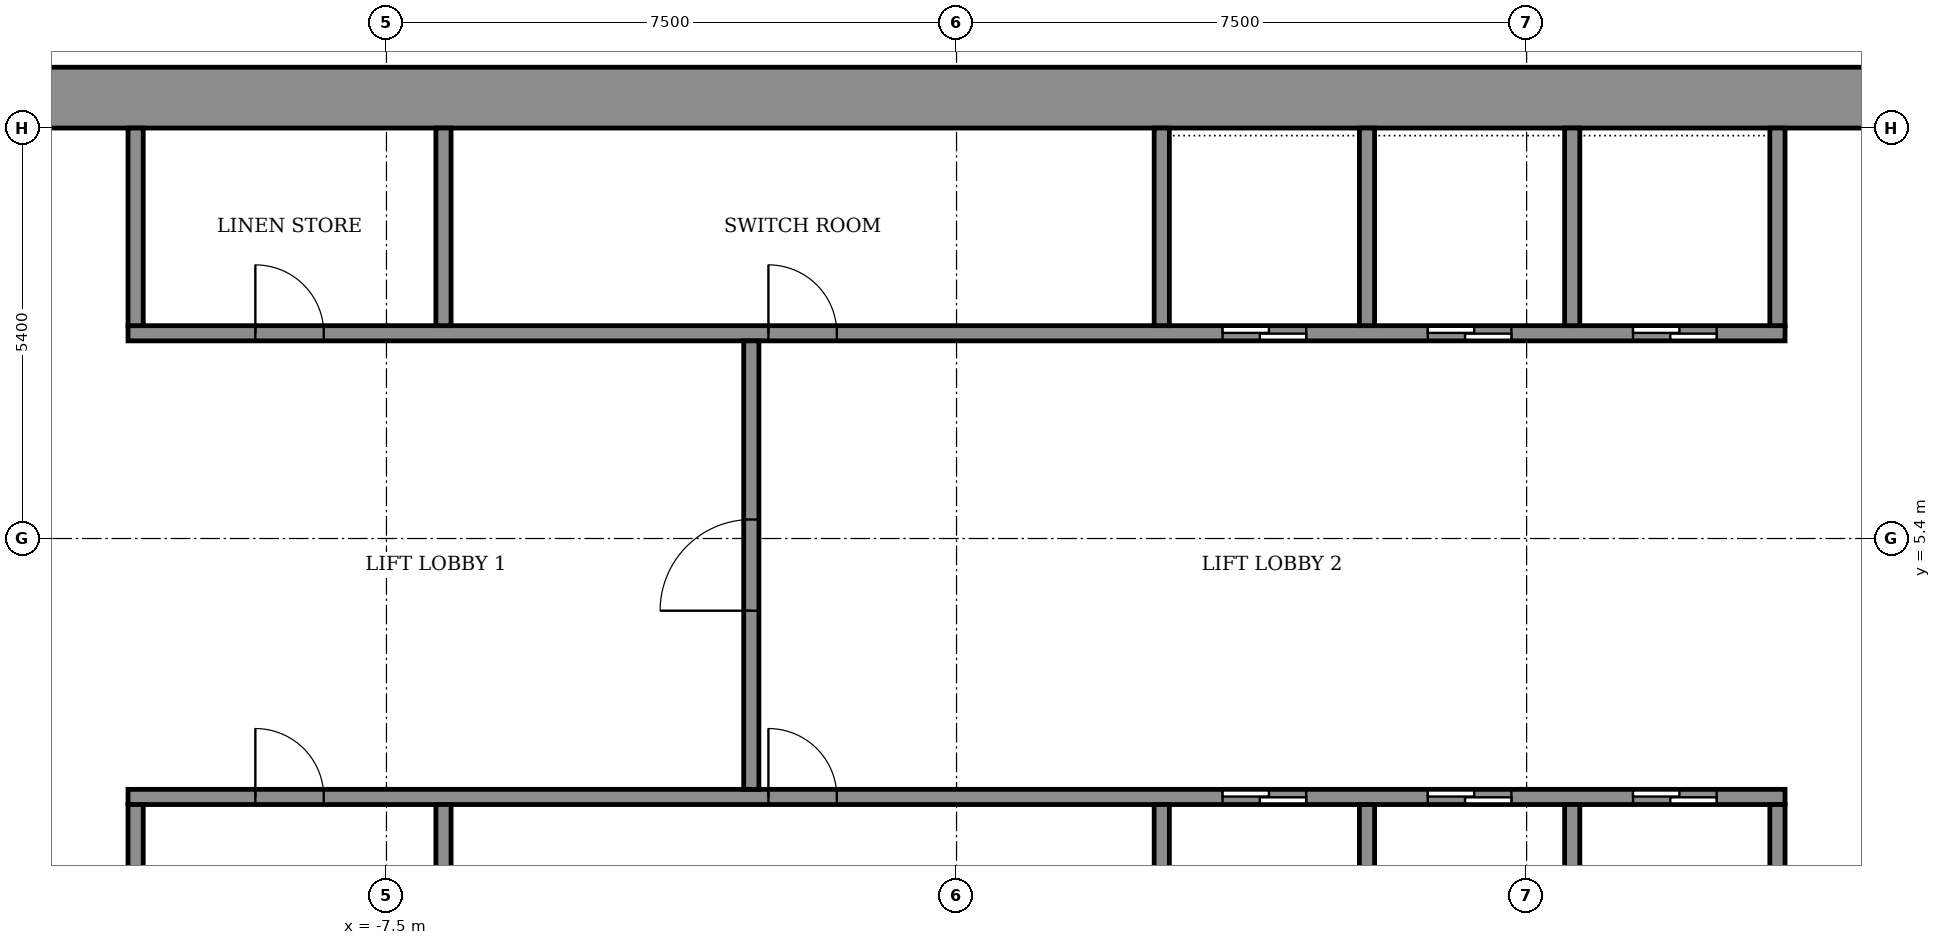
"""IFC4 building model, lengths in metres.
Left out: names, types, materials, properties, quantities, classifications, styles, units other than length and angle.
Written with IfcOpenShell. Run it as: python <this file> out.ifc"""

import sys

from ifc_helpers import new_model, si_unit, direction, frame, frame_2d, origin, place, context, subcontext, project, spatial, rectangle, extrude, element, fill, save


model = new_model("IFC4")
c1 = context("Model", 3, precision=1e-05, world=origin(), true_north=direction((0.0, 1.0)))
c2 = subcontext(c1, "Body", "Model", "MODEL_VIEW")
j1 = project(units=[si_unit("LENGTHUNIT", "METRE"), si_unit("PLANEANGLEUNIT", "RADIAN")], contexts=[c1])
p1 = place(None, origin())
s1 = spatial("IfcSite", under=j1, at=p1, CompositionType="ELEMENT")
p2 = place(p1, origin())
s2 = spatial("IfcBuilding", under=s1, at=p2, CompositionType="ELEMENT")
p3 = place(p2, frame((0.0, 0.0, 197.9)))
s3 = spatial("IfcBuildingStorey", under=s2, at=p3, CompositionType="ELEMENT", Elevation=197.9)
p4 = place(p3, frame((-14.6, 11.2, 0.0), z_axis=(0.0, 0.0, 1.0), x_axis=(1.0, 0.0, 0.0)))
e1 = element("IfcWall", 1, at=p4, inside=s3, PredefinedType="SHEAR", context=c2, shape_type="SweptSolid", body=[
    extrude(rectangle(XDim=29.2, YDim=0.8, at=frame_2d((14.6, 0.0))), origin(), (0.0, 0.0, 1.0), 3.6),
])
p5 = place(p3, frame((-10.9, 2.0, 0.0), z_axis=(0.0, 0.0, 1.0), x_axis=(1.0, 0.0, 0.0)))
e2 = element("IfcWall", 2, at=p5, inside=s3, PredefinedType="SHEAR", context=c2, shape_type="SweptSolid", body=[
    extrude(rectangle(XDim=21.8, YDim=0.2, at=frame_2d((10.9, 0.0))), origin(), (0.0, 0.0, 1.0), 3.05),
])
p6 = place(p5, frame((14.4, 0.0, 0.0)))
e3 = element("IfcOpeningElement", 3, at=p6, cuts=e2, PredefinedType="OPENING", context=c2, shape_type="SweptSolid", body=[
    extrude(rectangle(XDim=1.1, YDim=2.1, at=frame_2d((0.55, 1.05))), frame((0.0, 0.11, 0.0), z_axis=(0.0, -1.0, 0.0), x_axis=(1.0, 0.0, 0.0)), (0.0, 0.0, 1.0), 0.22),
])
p7 = place(p5, frame((17.1, 0.0, 0.0)))
e4 = element("IfcOpeningElement", 4, at=p7, cuts=e2, PredefinedType="OPENING", context=c2, shape_type="SweptSolid", body=[
    extrude(rectangle(XDim=1.1, YDim=2.1, at=frame_2d((0.55, 1.05))), frame((0.0, 0.11, 0.0), z_axis=(0.0, -1.0, 0.0), x_axis=(1.0, 0.0, 0.0)), (0.0, 0.0, 1.0), 0.22),
])
p8 = place(p5, frame((19.8, 0.0, 0.0)))
e5 = element("IfcOpeningElement", 5, at=p8, cuts=e2, PredefinedType="OPENING", context=c2, shape_type="SweptSolid", body=[
    extrude(rectangle(XDim=1.1, YDim=2.1, at=frame_2d((0.55, 1.05))), frame((0.0, 0.11, 0.0), z_axis=(0.0, -1.0, 0.0), x_axis=(1.0, 0.0, 0.0)), (0.0, 0.0, 1.0), 0.22),
])
p9 = place(p5, frame((1.675, 0.0, 0.0)))
e6 = element("IfcOpeningElement", 6, at=p9, cuts=e2, PredefinedType="OPENING", context=c2, shape_type="SweptSolid", body=[
    extrude(rectangle(XDim=0.9, YDim=2.1, at=frame_2d((0.45, 1.05))), frame((0.0, 0.11, 0.0), z_axis=(0.0, -1.0, 0.0), x_axis=(1.0, 0.0, 0.0)), (0.0, 0.0, 1.0), 0.22),
])
p10 = place(p5, frame((8.425, 0.0, 0.0)))
e7 = element("IfcOpeningElement", 7, at=p10, cuts=e2, PredefinedType="OPENING", context=c2, shape_type="SweptSolid", body=[
    extrude(rectangle(XDim=0.9, YDim=2.1, at=frame_2d((0.45, 1.05))), frame((0.0, 0.11, 0.0), z_axis=(0.0, -1.0, 0.0), x_axis=(1.0, 0.0, 0.0)), (0.0, 0.0, 1.0), 0.22),
])
p11 = place(p3, frame((-10.9, 8.1, 0.0), z_axis=(0.0, 0.0, 1.0), x_axis=(1.0, 0.0, 0.0)))
e8 = element("IfcWall", 8, at=p11, inside=s3, PredefinedType="SHEAR", context=c2, shape_type="SweptSolid", body=[
    extrude(rectangle(XDim=21.8, YDim=0.2, at=frame_2d((10.9, 0.0))), origin(), (0.0, 0.0, 1.0), 3.05),
])
p12 = place(p11, frame((14.4, 0.0, 0.0)))
e9 = element("IfcOpeningElement", 9, at=p12, cuts=e8, PredefinedType="OPENING", context=c2, shape_type="SweptSolid", body=[
    extrude(rectangle(XDim=1.1, YDim=2.1, at=frame_2d((0.55, 1.05))), frame((0.0, 0.11, 0.0), z_axis=(0.0, -1.0, 0.0), x_axis=(1.0, 0.0, 0.0)), (0.0, 0.0, 1.0), 0.22),
])
p13 = place(p11, frame((17.1, 0.0, 0.0)))
e10 = element("IfcOpeningElement", 10, at=p13, cuts=e8, PredefinedType="OPENING", context=c2, shape_type="SweptSolid", body=[
    extrude(rectangle(XDim=1.1, YDim=2.1, at=frame_2d((0.55, 1.05))), frame((0.0, 0.11, 0.0), z_axis=(0.0, -1.0, 0.0), x_axis=(1.0, 0.0, 0.0)), (0.0, 0.0, 1.0), 0.22),
])
p14 = place(p11, frame((19.8, 0.0, 0.0)))
e11 = element("IfcOpeningElement", 11, at=p14, cuts=e8, PredefinedType="OPENING", context=c2, shape_type="SweptSolid", body=[
    extrude(rectangle(XDim=1.1, YDim=2.1, at=frame_2d((0.55, 1.05))), frame((0.0, 0.11, 0.0), z_axis=(0.0, -1.0, 0.0), x_axis=(1.0, 0.0, 0.0)), (0.0, 0.0, 1.0), 0.22),
])
p15 = place(p11, frame((1.675, 0.0, 0.0)))
e12 = element("IfcOpeningElement", 12, at=p15, cuts=e8, PredefinedType="OPENING", context=c2, shape_type="SweptSolid", body=[
    extrude(rectangle(XDim=0.9, YDim=2.1, at=frame_2d((0.45, 1.05))), frame((0.0, 0.11, 0.0), z_axis=(0.0, -1.0, 0.0), x_axis=(1.0, 0.0, 0.0)), (0.0, 0.0, 1.0), 0.22),
])
p16 = place(p11, frame((8.425, 0.0, 0.0)))
e13 = element("IfcOpeningElement", 13, at=p16, cuts=e8, PredefinedType="OPENING", context=c2, shape_type="SweptSolid", body=[
    extrude(rectangle(XDim=0.9, YDim=2.1, at=frame_2d((0.45, 1.05))), frame((0.0, 0.11, 0.0), z_axis=(0.0, -1.0, 0.0), x_axis=(1.0, 0.0, 0.0)), (0.0, 0.0, 1.0), 0.22),
])
for number, where, z_axis, x_axis in (
    (14, (-10.8, -0.6, 0.0), (0.0, 0.0, 1.0), (0.0, 1.0, 0.0)),
    (15, (-6.75, -0.6, 0.0), (0.0, 0.0, 1.0), (0.0, 1.0, 0.0)),
):
    element("IfcWall", number, at=place(p3, frame(where, z_axis=z_axis, x_axis=x_axis)), inside=s3, PredefinedType="STANDARD", context=c2, shape_type="SweptSolid", body=[
        extrude(rectangle(XDim=2.5, YDim=0.2, at=frame_2d((1.25, 0.0))), origin(), (0.0, 0.0, 1.0), 3.05),
    ])
for number, where, z_axis, x_axis in (
    (16, (2.7, -0.6, 0.0), (0.0, 0.0, 1.0), (0.0, 1.0, 0.0)),
    (17, (5.4, -0.6, 0.0), (0.0, 0.0, 1.0), (0.0, 1.0, 0.0)),
    (18, (8.1, -0.6, 0.0), (0.0, 0.0, 1.0), (0.0, 1.0, 0.0)),
    (19, (10.8, -0.6, 0.0), (0.0, 0.0, 1.0), (0.0, 1.0, 0.0)),
):
    element("IfcWall", number, at=place(p3, frame(where, z_axis=z_axis, x_axis=x_axis)), inside=s3, PredefinedType="SHEAR", context=c2, shape_type="SweptSolid", body=[
        extrude(rectangle(XDim=2.5, YDim=0.2, at=frame_2d((1.25, 0.0))), origin(), (0.0, 0.0, 1.0), 3.05),
    ])
for number, where, z_axis, x_axis in (
    (20, (-10.8, 8.2, 0.0), (0.0, 0.0, 1.0), (0.0, 1.0, 0.0)),
    (21, (-6.75, 8.2, 0.0), (0.0, 0.0, 1.0), (0.0, 1.0, 0.0)),
):
    element("IfcWall", number, at=place(p3, frame(where, z_axis=z_axis, x_axis=x_axis)), inside=s3, PredefinedType="STANDARD", context=c2, shape_type="SweptSolid", body=[
        extrude(rectangle(XDim=2.6, YDim=0.2, at=frame_2d((1.3, 0.0))), origin(), (0.0, 0.0, 1.0), 3.05),
    ])
for number, where, z_axis, x_axis in (
    (22, (2.7, 8.2, 0.0), (0.0, 0.0, 1.0), (0.0, 1.0, 0.0)),
    (23, (5.4, 8.2, 0.0), (0.0, 0.0, 1.0), (0.0, 1.0, 0.0)),
    (24, (8.1, 8.2, 0.0), (0.0, 0.0, 1.0), (0.0, 1.0, 0.0)),
    (25, (10.8, 8.2, 0.0), (0.0, 0.0, 1.0), (0.0, 1.0, 0.0)),
):
    element("IfcWall", number, at=place(p3, frame(where, z_axis=z_axis, x_axis=x_axis)), inside=s3, PredefinedType="SHEAR", context=c2, shape_type="SweptSolid", body=[
        extrude(rectangle(XDim=2.6, YDim=0.2, at=frame_2d((1.3, 0.0))), origin(), (0.0, 0.0, 1.0), 3.05),
    ])
p17 = place(p3, frame((-2.7, 2.1, 0.0), z_axis=(0.0, 0.0, 1.0), x_axis=(0.0, 1.0, 0.0)))
e26 = element("IfcWall", 26, at=p17, inside=s3, PredefinedType="STANDARD", context=c2, shape_type="SweptSolid", body=[
    extrude(rectangle(XDim=5.9, YDim=0.2, at=frame_2d((2.95, 0.0))), origin(), (0.0, 0.0, 1.0), 3.05),
])
p18 = place(p17, frame((2.35, 0.0, 0.0)))
e27 = element("IfcOpeningElement", 27, at=p18, cuts=e26, PredefinedType="OPENING", context=c2, shape_type="SweptSolid", body=[
    extrude(rectangle(XDim=1.2, YDim=2.1, at=frame_2d((0.6, 1.05))), frame((0.0, 0.11, 0.0), z_axis=(0.0, -1.0, 0.0), x_axis=(1.0, 0.0, 0.0)), (0.0, 0.0, 1.0), 0.22),
])
p19 = place(p6, origin())
e28 = element("IfcDoor", 28, at=p19, inside=s3, OperationType="SLIDING_TO_LEFT", PredefinedType="DOOR", context=c2, shape_type="SweptSolid", body=[
    extrude(rectangle(XDim=1.1, YDim=2.1, at=frame_2d((0.55, 1.05))), frame((0.0, 0.025, 0.0), z_axis=(0.0, -1.0, 0.0), x_axis=(1.0, 0.0, 0.0)), (0.0, 0.0, 1.0), 0.05),
])
fill(e3, e28)
p20 = place(p7, origin())
e29 = element("IfcDoor", 29, at=p20, inside=s3, OperationType="SLIDING_TO_LEFT", PredefinedType="DOOR", context=c2, shape_type="SweptSolid", body=[
    extrude(rectangle(XDim=1.1, YDim=2.1, at=frame_2d((0.55, 1.05))), frame((0.0, 0.025, 0.0), z_axis=(0.0, -1.0, 0.0), x_axis=(1.0, 0.0, 0.0)), (0.0, 0.0, 1.0), 0.05),
])
fill(e4, e29)
p21 = place(p8, origin())
e30 = element("IfcDoor", 30, at=p21, inside=s3, OperationType="SLIDING_TO_LEFT", PredefinedType="DOOR", context=c2, shape_type="SweptSolid", body=[
    extrude(rectangle(XDim=1.1, YDim=2.1, at=frame_2d((0.55, 1.05))), frame((0.0, 0.025, 0.0), z_axis=(0.0, -1.0, 0.0), x_axis=(1.0, 0.0, 0.0)), (0.0, 0.0, 1.0), 0.05),
])
fill(e5, e30)
p22 = place(p12, origin())
e31 = element("IfcDoor", 31, at=p22, inside=s3, OperationType="SLIDING_TO_LEFT", PredefinedType="DOOR", context=c2, shape_type="SweptSolid", body=[
    extrude(rectangle(XDim=1.1, YDim=2.1, at=frame_2d((0.55, 1.05))), frame((0.0, 0.025, 0.0), z_axis=(0.0, -1.0, 0.0), x_axis=(1.0, 0.0, 0.0)), (0.0, 0.0, 1.0), 0.05),
])
fill(e9, e31)
p23 = place(p13, origin())
e32 = element("IfcDoor", 32, at=p23, inside=s3, OperationType="SLIDING_TO_LEFT", PredefinedType="DOOR", context=c2, shape_type="SweptSolid", body=[
    extrude(rectangle(XDim=1.1, YDim=2.1, at=frame_2d((0.55, 1.05))), frame((0.0, 0.025, 0.0), z_axis=(0.0, -1.0, 0.0), x_axis=(1.0, 0.0, 0.0)), (0.0, 0.0, 1.0), 0.05),
])
fill(e10, e32)
p24 = place(p14, origin())
e33 = element("IfcDoor", 33, at=p24, inside=s3, OperationType="SLIDING_TO_LEFT", PredefinedType="DOOR", context=c2, shape_type="SweptSolid", body=[
    extrude(rectangle(XDim=1.1, YDim=2.1, at=frame_2d((0.55, 1.05))), frame((0.0, 0.025, 0.0), z_axis=(0.0, -1.0, 0.0), x_axis=(1.0, 0.0, 0.0)), (0.0, 0.0, 1.0), 0.05),
])
fill(e11, e33)
p25 = place(p9, origin())
e34 = element("IfcDoor", 34, at=p25, inside=s3, OperationType="SINGLE_SWING_RIGHT", PredefinedType="DOOR", context=c2, shape_type="SweptSolid", body=[
    extrude(rectangle(XDim=0.9, YDim=2.1, at=frame_2d((0.45, 1.05))), frame((0.0, 0.025, 0.0), z_axis=(0.0, -1.0, 0.0), x_axis=(1.0, 0.0, 0.0)), (0.0, 0.0, 1.0), 0.05),
])
fill(e6, e34)
p26 = place(p10, origin())
e35 = element("IfcDoor", 35, at=p26, inside=s3, OperationType="SINGLE_SWING_LEFT", PredefinedType="DOOR", context=c2, shape_type="SweptSolid", body=[
    extrude(rectangle(XDim=0.9, YDim=2.1, at=frame_2d((0.45, 1.05))), frame((0.0, 0.025, 0.0), z_axis=(0.0, -1.0, 0.0), x_axis=(1.0, 0.0, 0.0)), (0.0, 0.0, 1.0), 0.05),
])
fill(e7, e35)
p27 = place(p15, origin())
e36 = element("IfcDoor", 36, at=p27, inside=s3, OperationType="SINGLE_SWING_RIGHT", PredefinedType="DOOR", context=c2, shape_type="SweptSolid", body=[
    extrude(rectangle(XDim=0.9, YDim=2.1, at=frame_2d((0.45, 1.05))), frame((0.0, 0.025, 0.0), z_axis=(0.0, -1.0, 0.0), x_axis=(1.0, 0.0, 0.0)), (0.0, 0.0, 1.0), 0.05),
])
fill(e12, e36)
p28 = place(p16, origin())
e37 = element("IfcDoor", 37, at=p28, inside=s3, OperationType="SINGLE_SWING_LEFT", PredefinedType="DOOR", context=c2, shape_type="SweptSolid", body=[
    extrude(rectangle(XDim=0.9, YDim=2.1, at=frame_2d((0.45, 1.05))), frame((0.0, 0.025, 0.0), z_axis=(0.0, -1.0, 0.0), x_axis=(1.0, 0.0, 0.0)), (0.0, 0.0, 1.0), 0.05),
])
fill(e13, e37)
p29 = place(p18, origin())
e38 = element("IfcDoor", 38, at=p29, inside=s3, OperationType="SINGLE_SWING_LEFT", PredefinedType="DOOR", context=c2, shape_type="SweptSolid", body=[
    extrude(rectangle(XDim=1.2, YDim=2.1, at=frame_2d((0.6, 1.05))), frame((0.0, 0.025, 0.0), z_axis=(0.0, -1.0, 0.0), x_axis=(1.0, 0.0, 0.0)), (0.0, 0.0, 1.0), 0.05),
])
fill(e27, e38)
save(model, sys.argv[1])
